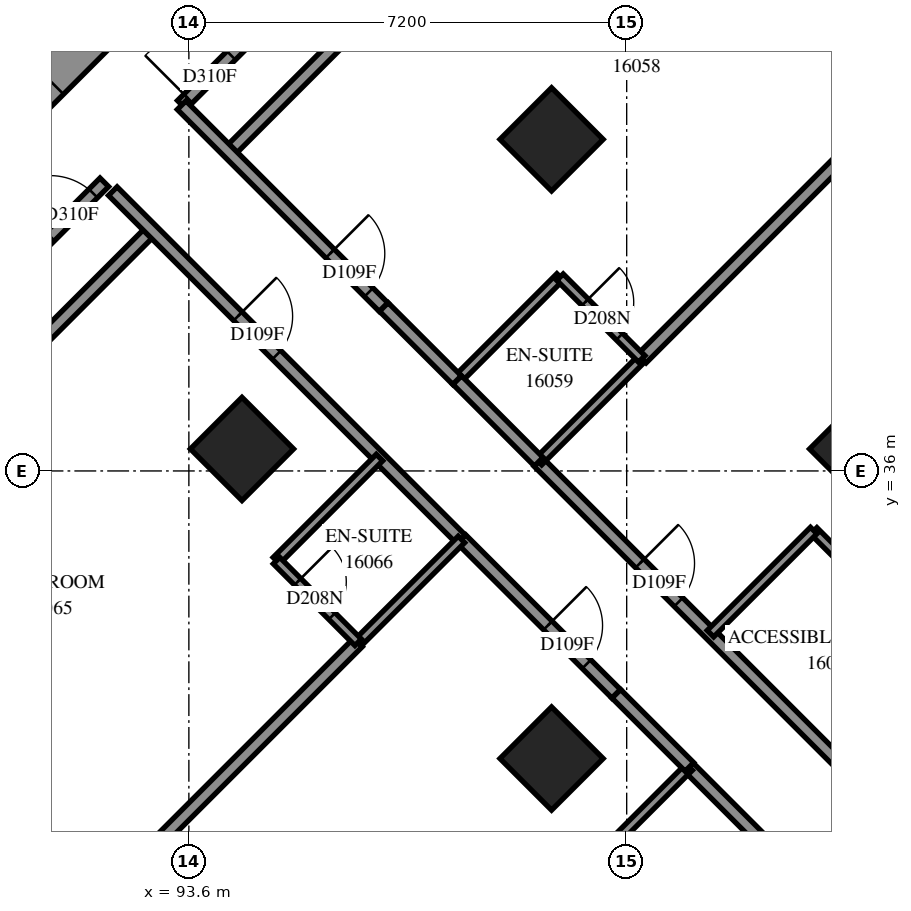
"""IFC4 building model, lengths in metres.
Left out: names, types, materials, properties, quantities, classifications, styles, units other than length and angle.
Written with IfcOpenShell. Run it as: python <this file> out.ifc"""

import sys

from ifc_helpers import new_model, si_unit, direction, frame, frame_2d, origin, origin_2d, place, context, subcontext, project, spatial, polyline, rectangle, outline, extrude, element, fill, save


model = new_model("IFC4")
c1 = context("Model", 3, precision=1e-05, world=origin(), true_north=direction((0.0, 1.0)))
c2 = subcontext(c1, "Body", "Model", "MODEL_VIEW")
j1 = project(units=[si_unit("LENGTHUNIT", "METRE"), si_unit("PLANEANGLEUNIT", "RADIAN")], contexts=[c1])
p1 = place(None, origin())
s1 = spatial("IfcSite", under=j1, at=p1, CompositionType="ELEMENT")
p2 = place(p1, origin())
s2 = spatial("IfcBuilding", under=s1, at=p2, CompositionType="ELEMENT")
p3 = place(p2, frame((0.0, 0.0, 61.0)))
s3 = spatial("IfcBuildingStorey", under=s2, at=p3, CompositionType="ELEMENT", Elevation=61.0)
for number, where, z_axis, x_axis in (
    (1, (99.565, 41.453, 0.0), (0.0, 0.0, 1.0), (0.707, -0.707, 0.0)),
    (2, (94.474, 36.362, 0.0), (0.0, 0.0, 1.0), (0.707, -0.707, 0.0)),
    (3, (104.656, 36.362, 0.0), (0.0, 0.0, 1.0), (0.707, -0.707, 0.0)),
    (4, (99.565, 31.271, 0.0), (0.0, 0.0, 1.0), (0.707, -0.707, 0.0)),
):
    element("IfcColumn", number, at=place(p3, frame(where, z_axis=z_axis, x_axis=x_axis)), inside=s3, PredefinedType="COLUMN", context=c2, shape_type="SweptSolid", body=[
        extrude(rectangle(XDim=1.2, YDim=1.2, at=origin_2d()), origin(), (0.0, 0.0, 1.0), 3.1),
    ])
p4 = place(p3, frame((87.19, 38.554, -0.3), z_axis=(0.0, 0.0, 1.0), x_axis=(0.707103309, 0.7071102534, 0.0)))
e5 = element("IfcWall", 5, at=p4, inside=s3, PredefinedType="SHEAR", context=c2, shape_type="SweptSolid", body=[
    extrude(rectangle(XDim=14.4, YDim=1.0, at=frame_2d((7.2, 0.0))), origin(), (0.0, 0.0, 1.0), 2.7),
])
p5 = place(p4, frame((4.55, 0.0, 0.3)))
e6 = element("IfcOpeningElement", 6, at=p5, cuts=e5, PredefinedType="OPENING", context=c2, shape_type="SweptSolid", body=[
    extrude(rectangle(XDim=1.1, YDim=2.1, at=frame_2d((0.55, 1.05))), frame((0.0, 0.51, 0.0), z_axis=(0.0, -1.0, 0.0), x_axis=(1.0, 0.0, 0.0)), (0.0, 0.0, 1.0), 1.02),
])
p6 = place(p4, frame((11.35, 0.0, 0.3)))
e7 = element("IfcOpeningElement", 7, at=p6, cuts=e5, PredefinedType="OPENING", context=c2, shape_type="SweptSolid", body=[
    extrude(rectangle(XDim=1.1, YDim=2.1, at=frame_2d((0.55, 1.05))), frame((0.0, 0.51, 0.0), z_axis=(0.0, -1.0, 0.0), x_axis=(1.0, 0.0, 0.0)), (0.0, 0.0, 1.0), 1.02),
])
p7 = place(p3, frame((88.018, 30.479, 0.0), z_axis=(0.0, 0.0, 1.0), x_axis=(0.8076021815, -0.589727663, 0.0)))
e8 = element("IfcWall", 8, at=p7, inside=s3, PredefinedType="SOLIDWALL", context=c2, shape_type="SweptSolid", body=[
    extrude(outline(polyline([(-0.043, -0.275), (3.871, -0.275), (3.957, 0.275), (0.043, 0.275), (-0.043, -0.275)])), origin(), (0.0, 0.0, 1.0), 3.1),
])
p8 = place(p7, frame((0.662, 0.0, 0.5)))
e9 = element("IfcOpeningElement", 9, at=p8, cuts=e8, PredefinedType="OPENING", context=c2, shape_type="SweptSolid", body=[
    extrude(rectangle(XDim=2.8, YDim=2.45, at=frame_2d((1.4, 1.225))), frame((0.0, 0.285, 0.0), z_axis=(0.0, -1.0, 0.0), x_axis=(1.0, 0.0, 0.0)), (0.0, 0.0, 1.0), 0.57),
])
p9 = place(p3, frame((101.825, 31.125, 0.0), z_axis=(0.0, 0.0, 1.0), x_axis=(0.7071067812, -0.7071067812, 0.0)))
e10 = element("IfcWall", 10, at=p9, inside=s3, PredefinedType="PARTITIONING", context=c2, shape_type="SweptSolid", body=[
    extrude(rectangle(XDim=12.7, YDim=0.2, at=frame_2d((6.35, 0.0))), origin(), (0.0, 0.0, 1.0), 3.1),
])
p10 = place(p9, frame((3.895, 0.0, 0.0)))
e11 = element("IfcOpeningElement", 11, at=p10, cuts=e10, PredefinedType="OPENING", context=c2, shape_type="SweptSolid", body=[
    extrude(rectangle(XDim=0.9, YDim=2.1, at=frame_2d((0.45, 1.05))), frame((0.0, 0.11, 0.0), z_axis=(0.0, -1.0, 0.0), x_axis=(1.0, 0.0, 0.0)), (0.0, 0.0, 1.0), 0.22),
])
p11 = place(p9, frame((9.056, 0.0, 0.0)))
e12 = element("IfcOpeningElement", 12, at=p11, cuts=e10, PredefinedType="OPENING", context=c2, shape_type="SweptSolid", body=[
    extrude(rectangle(XDim=1.0, YDim=2.1, at=frame_2d((0.5, 1.05))), frame((0.0, 0.11, 0.0), z_axis=(0.0, -1.0, 0.0), x_axis=(1.0, 0.0, 0.0)), (0.0, 0.0, 1.0), 0.22),
])
p12 = place(p3, frame((94.259, 41.243, 0.0), z_axis=(0.0, 0.0, 1.0), x_axis=(0.7070205168, 0.707193035, 0.0)))
e13 = element("IfcWall", 13, at=p12, inside=s3, PredefinedType="PARTITIONING", context=c2, shape_type="SweptSolid", body=[
    extrude(rectangle(XDim=12.173, YDim=0.2, at=frame_2d((6.086, 0.0))), origin(), (0.0, 0.0, 1.0), 3.1),
])
p13 = place(p3, frame((93.484, 42.02, 0.0), z_axis=(0.0, 0.0, 1.0), x_axis=(0.7071067812, 0.7071067812, 0.0)))
e14 = element("IfcWall", 14, at=p13, inside=s3, PredefinedType="PARTITIONING", context=c2, shape_type="SweptSolid", body=[
    extrude(rectangle(XDim=9.998, YDim=0.2, at=frame_2d((4.999, 0.0))), origin(), (0.0, 0.0, 1.0), 3.1),
])
p14 = place(p13, frame((0.148, 0.0, 0.0)))
e15 = element("IfcOpeningElement", 15, at=p14, cuts=e14, PredefinedType="OPENING", context=c2, shape_type="SweptSolid", body=[
    extrude(rectangle(XDim=1.0, YDim=2.1, at=frame_2d((0.5, 1.05))), frame((0.0, 0.11, 0.0), z_axis=(0.0, -1.0, 0.0), x_axis=(1.0, 0.0, 0.0)), (0.0, 0.0, 1.0), 0.22),
])
p15 = place(p3, frame((101.049, 37.847, 0.0), z_axis=(0.0, 0.0, 1.0), x_axis=(0.7071067812, 0.7071067812, 0.0)))
e16 = element("IfcWall", 16, at=p15, inside=s3, PredefinedType="PARTITIONING", context=c2, shape_type="SweptSolid", body=[
    extrude(rectangle(XDim=9.831, YDim=0.2, at=frame_2d((4.915, 0.0))), origin(), (0.0, 0.0, 1.0), 3.1),
])
p16 = place(p3, frame((86.311, 33.282, 0.0), z_axis=(0.0, 0.0, 1.0), x_axis=(0.7069956462, 0.7072178987, 0.0)))
e17 = element("IfcWall", 17, at=p16, inside=s3, PredefinedType="PARTITIONING", context=c2, shape_type="SweptSolid", body=[
    extrude(rectangle(XDim=9.449, YDim=0.2, at=frame_2d((4.724, 0.0))), origin(), (0.0, 0.0, 1.0), 3.1),
])
p17 = place(p3, frame((92.349, 40.601, 0.0), z_axis=(0.0, 0.0, 1.0), x_axis=(0.7071067812, -0.7071067812, 0.0)))
e18 = element("IfcWall", 18, at=p17, inside=s3, PredefinedType="PARTITIONING", context=c2, shape_type="SweptSolid", body=[
    extrude(rectangle(XDim=8.101, YDim=0.2, at=frame_2d((4.05, 0.0))), origin(), (0.0, 0.0, 1.0), 3.1),
])
p18 = place(p17, frame((2.909, 0.0, 0.0)))
e19 = element("IfcOpeningElement", 19, at=p18, cuts=e18, PredefinedType="OPENING", context=c2, shape_type="SweptSolid", body=[
    extrude(rectangle(XDim=0.9, YDim=2.1, at=frame_2d((0.45, 1.05))), frame((0.0, 0.11, 0.0), z_axis=(0.0, -1.0, 0.0), x_axis=(1.0, 0.0, 0.0)), (0.0, 0.0, 1.0), 0.22),
])
p19 = place(p3, frame((86.836, 35.372, 0.0), z_axis=(0.0, 0.0, 1.0), x_axis=(0.7071067812, 0.7071067812, 0.0)))
e20 = element("IfcWall", 20, at=p19, inside=s3, PredefinedType="PARTITIONING", context=c2, shape_type="SweptSolid", body=[
    extrude(rectangle(XDim=7.6, YDim=0.2, at=frame_2d((3.8, 0.0))), origin(), (0.0, 0.0, 1.0), 3.1),
])
p20 = place(p19, frame((6.342, 0.0, 0.0)))
e21 = element("IfcOpeningElement", 21, at=p20, cuts=e20, PredefinedType="OPENING", context=c2, shape_type="SweptSolid", body=[
    extrude(rectangle(XDim=1.0, YDim=2.1, at=frame_2d((0.5, 1.05))), frame((0.0, 0.11, 0.0), z_axis=(0.0, -1.0, 0.0), x_axis=(1.0, 0.0, 0.0)), (0.0, 0.0, 1.0), 0.22),
])
p21 = place(p3, frame((99.349, 36.147, 0.0), z_axis=(0.0, 0.0, 1.0), x_axis=(0.7071067812, -0.7071067812, 0.0)))
e22 = element("IfcWall", 22, at=p21, inside=s3, PredefinedType="PARTITIONING", context=c2, shape_type="SweptSolid", body=[
    extrude(rectangle(XDim=7.201, YDim=0.2, at=frame_2d((3.601, 0.0))), origin(), (0.0, 0.0, 1.0), 3.1),
])
p22 = place(p21, frame((2.358, 0.0, 0.0)))
e23 = element("IfcOpeningElement", 23, at=p22, cuts=e22, PredefinedType="OPENING", context=c2, shape_type="SweptSolid", body=[
    extrude(rectangle(XDim=0.9, YDim=2.1, at=frame_2d((0.45, 1.05))), frame((0.0, 0.11, 0.0), z_axis=(0.0, -1.0, 0.0), x_axis=(1.0, 0.0, 0.0)), (0.0, 0.0, 1.0), 0.22),
])
p23 = place(p3, frame((91.457, 28.256, 0.0), z_axis=(0.0, 0.0, 1.0), x_axis=(0.7071067812, 0.7071067812, 0.0)))
e24 = element("IfcWall", 24, at=p23, inside=s3, PredefinedType="PARTITIONING", context=c2, shape_type="SweptSolid", body=[
    extrude(rectangle(XDim=6.964, YDim=0.2, at=frame_2d((3.482, 0.0))), origin(), (0.0, 0.0, 1.0), 3.1),
])
p24 = place(p3, frame((93.481, 42.015, 0.0), z_axis=(0.0, 0.0, 1.0), x_axis=(0.7071067812, -0.7071067812, 0.0)))
e25 = element("IfcWall", 25, at=p24, inside=s3, PredefinedType="PARTITIONING", context=c2, shape_type="SweptSolid", body=[
    extrude(rectangle(XDim=4.698, YDim=0.2, at=frame_2d((2.349, 0.0))), origin(), (0.0, 0.0, 1.0), 3.1),
])
p25 = place(p24, frame((3.452, 0.0, 0.0)))
e26 = element("IfcOpeningElement", 26, at=p25, cuts=e25, PredefinedType="OPENING", context=c2, shape_type="SweptSolid", body=[
    extrude(rectangle(XDim=0.9, YDim=2.1, at=frame_2d((0.45, 1.05))), frame((0.0, 0.11, 0.0), z_axis=(0.0, -1.0, 0.0), x_axis=(1.0, 0.0, 0.0)), (0.0, 0.0, 1.0), 0.22),
])
p26 = place(p3, frame((98.082, 34.879, 0.0), z_axis=(0.0, 0.0, 1.0), x_axis=(0.7073845681, -0.7068288851, 0.0)))
e27 = element("IfcWall", 27, at=p26, inside=s3, PredefinedType="PARTITIONING", context=c2, shape_type="SweptSolid", body=[
    extrude(rectangle(XDim=3.599, YDim=0.2, at=frame_2d((1.8, 0.0))), origin(), (0.0, 0.0, 1.0), 3.1),
])
p27 = place(p26, frame((2.009, 0.0, 0.0)))
e28 = element("IfcOpeningElement", 28, at=p27, cuts=e27, PredefinedType="OPENING", context=c2, shape_type="SweptSolid", body=[
    extrude(rectangle(XDim=0.9, YDim=2.1, at=frame_2d((0.45, 1.05))), frame((0.0, 0.11, 0.0), z_axis=(0.0, -1.0, 0.0), x_axis=(1.0, 0.0, 0.0)), (0.0, 0.0, 1.0), 0.22),
])
p28 = place(p3, frame((103.875, 35.015, 0.0), z_axis=(0.0, 0.0, 1.0), x_axis=(0.7071067812, -0.7071067812, 0.0)))
e29 = element("IfcWall", 29, at=p28, inside=s3, PredefinedType="PARTITIONING", context=c2, shape_type="SweptSolid", body=[
    extrude(rectangle(XDim=3.199, YDim=0.15, at=frame_2d((1.599, 0.0))), origin(), (0.0, 0.0, 1.0), 3.1),
])
p29 = place(p28, frame((1.27, 0.0, 0.0)))
e30 = element("IfcOpeningElement", 30, at=p29, cuts=e29, PredefinedType="OPENING", context=c2, shape_type="SweptSolid", body=[
    extrude(rectangle(XDim=0.8, YDim=2.1, at=frame_2d((0.4, 1.05))), frame((0.0, 0.085, 0.0), z_axis=(0.0, -1.0, 0.0), x_axis=(1.0, 0.0, 0.0)), (0.0, 0.0, 1.0), 0.17),
])
p30 = place(p3, frame((100.129, 29.433, 0.0), z_axis=(0.0, 0.0, 1.0), x_axis=(0.7071067812, 0.7071067812, 0.0)))
e31 = element("IfcWall", 31, at=p30, inside=s3, PredefinedType="PARTITIONING", context=c2, shape_type="SweptSolid", body=[
    extrude(rectangle(XDim=2.401, YDim=0.15, at=frame_2d((1.201, 0.0))), origin(), (0.0, 0.0, 1.0), 3.1),
])
for number, where, z_axis, x_axis in (
    (32, (96.384, 33.178, 0.0), (0.0, 0.0, 1.0), (0.708, 0.707, 0.0)),
    (33, (99.349, 36.153, 0.0), (0.0, 0.0, 1.0), (0.708, 0.707, 0.0)),
    (34, (102.177, 33.325, 0.0), (0.0, 0.0, 1.0), (0.708, 0.707, 0.0)),
):
    element("IfcWall", number, at=place(p3, frame(where, z_axis=z_axis, x_axis=x_axis)), inside=s3, PredefinedType="PARTITIONING", context=c2, shape_type="SweptSolid", body=[
        extrude(rectangle(XDim=2.4, YDim=0.15, at=frame_2d((1.2, 0.0))), origin(), (0.0, 0.0, 1.0), 3.1),
    ])
for number, where, z_axis, x_axis in (
    (35, (95.039, 34.525, 0.0), (0.0, 0.0, 1.0), (0.707, 0.707, 0.0)),
    (36, (98.009, 37.495, 0.0), (0.0, 0.0, 1.0), (0.707, 0.707, 0.0)),
):
    element("IfcWall", number, at=place(p3, frame(where, z_axis=z_axis, x_axis=x_axis)), inside=s3, PredefinedType="PARTITIONING", context=c2, shape_type="SweptSolid", body=[
        extrude(rectangle(XDim=2.398, YDim=0.15, at=frame_2d((1.199, 0.0))), origin(), (0.0, 0.0, 1.0), 3.1),
    ])
p31 = place(p3, frame((99.703, 39.187, 0.0), z_axis=(0.0, 0.0, 1.0), x_axis=(0.7071067812, -0.7071067812, 0.0)))
e37 = element("IfcWall", 37, at=p31, inside=s3, PredefinedType="PARTITIONING", context=c2, shape_type="SweptSolid", body=[
    extrude(rectangle(XDim=1.901, YDim=0.15, at=frame_2d((0.95, 0.0))), origin(), (0.0, 0.0, 1.0), 3.1),
])
p32 = place(p31, frame((0.584, 0.0, 0.0)))
e38 = element("IfcOpeningElement", 38, at=p32, cuts=e37, PredefinedType="OPENING", context=c2, shape_type="SweptSolid", body=[
    extrude(rectangle(XDim=0.8, YDim=2.1, at=frame_2d((0.4, 1.05))), frame((0.0, 0.085, 0.0), z_axis=(0.0, -1.0, 0.0), x_axis=(1.0, 0.0, 0.0)), (0.0, 0.0, 1.0), 0.17),
])
p33 = place(p3, frame((98.012, 37.496, 0.0), z_axis=(0.0, 0.0, 1.0), x_axis=(0.7065800724, -0.7076330979, 0.0)))
e39 = element("IfcWall", 39, at=p33, inside=s3, PredefinedType="PARTITIONING", context=c2, shape_type="SweptSolid", body=[
    extrude(rectangle(XDim=1.899, YDim=0.2, at=frame_2d((0.95, 0.0))), origin(), (0.0, 0.0, 1.0), 3.1),
])
p34 = place(p3, frame((95.042, 34.526, 0.0), z_axis=(0.0, 0.0, 1.0), x_axis=(0.7065800724, -0.7076330979, 0.0)))
e40 = element("IfcWall", 40, at=p34, inside=s3, PredefinedType="PARTITIONING", context=c2, shape_type="SweptSolid", body=[
    extrude(rectangle(XDim=1.899, YDim=0.15, at=frame_2d((0.95, 0.0))), origin(), (0.0, 0.0, 1.0), 3.1),
])
p35 = place(p34, frame((0.491, 0.0, 0.0)))
e41 = element("IfcOpeningElement", 41, at=p35, cuts=e40, PredefinedType="OPENING", context=c2, shape_type="SweptSolid", body=[
    extrude(rectangle(XDim=0.8, YDim=2.1, at=frame_2d((0.4, 1.05))), frame((0.0, 0.085, 0.0), z_axis=(0.0, -1.0, 0.0), x_axis=(1.0, 0.0, 0.0)), (0.0, 0.0, 1.0), 0.17),
])
p36 = place(p3, frame((96.806, 38.696, 0.0), z_axis=(0.0, 0.0, 1.0), x_axis=(0.7076943229, -0.7065187509, 0.0)))
e42 = element("IfcWall", 42, at=p36, inside=s3, PredefinedType="PARTITIONING", context=c2, shape_type="SweptSolid", body=[
    extrude(rectangle(XDim=1.701, YDim=0.2, at=frame_2d((0.851, 0.0))), origin(), (0.0, 0.0, 1.0), 3.1),
])
p37 = place(p3, frame((100.629, 32.335, 0.0), z_axis=(0.0, 0.0, 1.0), x_axis=(0.7071067812, -0.7071067812, 0.0)))
e43 = element("IfcWall", 43, at=p37, inside=s3, PredefinedType="PARTITIONING", context=c2, shape_type="SweptSolid", body=[
    extrude(rectangle(XDim=1.7, YDim=0.2, at=frame_2d((0.85, 0.0))), origin(), (0.0, 0.0, 1.0), 3.1),
])
p38 = place(p14, origin())
e44 = element("IfcDoor", 44, at=p38, inside=s3, OperationType="SINGLE_SWING_LEFT", PredefinedType="DOOR", context=c2, shape_type="SweptSolid", body=[
    extrude(rectangle(XDim=1.0, YDim=2.1, at=frame_2d((0.5, 1.05))), frame((0.0, 0.025, 0.0), z_axis=(0.0, -1.0, 0.0), x_axis=(1.0, 0.0, 0.0)), (0.0, 0.0, 1.0), 0.05),
])
fill(e15, e44)
p39 = place(p25, origin())
e45 = element("IfcDoor", 45, at=p39, inside=s3, OperationType="SINGLE_SWING_RIGHT", PredefinedType="DOOR", context=c2, shape_type="SweptSolid", body=[
    extrude(rectangle(XDim=0.9, YDim=2.1, at=frame_2d((0.45, 1.05))), frame((0.0, 0.025, 0.0), z_axis=(0.0, -1.0, 0.0), x_axis=(1.0, 0.0, 0.0)), (0.0, 0.0, 1.0), 0.05),
])
fill(e26, e45)
p40 = place(p32, origin())
e46 = element("IfcDoor", 46, at=p40, inside=s3, OperationType="SINGLE_SWING_RIGHT", PredefinedType="DOOR", context=c2, shape_type="SweptSolid", body=[
    extrude(rectangle(XDim=0.8, YDim=2.1, at=frame_2d((0.4, 1.05))), frame((0.0, 0.025, 0.0), z_axis=(0.0, -1.0, 0.0), x_axis=(1.0, 0.0, 0.0)), (0.0, 0.0, 1.0), 0.05),
])
fill(e38, e46)
p41 = place(p22, origin())
e47 = element("IfcDoor", 47, at=p41, inside=s3, OperationType="SINGLE_SWING_RIGHT", PredefinedType="DOOR", context=c2, shape_type="SweptSolid", body=[
    extrude(rectangle(XDim=0.9, YDim=2.1, at=frame_2d((0.45, 1.05))), frame((0.0, 0.025, 0.0), z_axis=(0.0, -1.0, 0.0), x_axis=(1.0, 0.0, 0.0)), (0.0, 0.0, 1.0), 0.05),
])
fill(e23, e47)
p42 = place(p20, origin())
e48 = element("IfcDoor", 48, at=p42, inside=s3, OperationType="SINGLE_SWING_RIGHT", PredefinedType="DOOR", context=c2, shape_type="SweptSolid", body=[
    extrude(rectangle(XDim=1.0, YDim=2.1, at=frame_2d((0.5, 1.05))), frame((0.0, 0.025, 0.0), z_axis=(0.0, -1.0, 0.0), x_axis=(1.0, 0.0, 0.0)), (0.0, 0.0, 1.0), 0.05),
])
fill(e21, e48)
p43 = place(p18, origin())
e49 = element("IfcDoor", 49, at=p43, inside=s3, OperationType="SINGLE_SWING_LEFT", PredefinedType="DOOR", context=c2, shape_type="SweptSolid", body=[
    extrude(rectangle(XDim=0.9, YDim=2.1, at=frame_2d((0.45, 1.05))), frame((0.0, 0.025, 0.0), z_axis=(0.0, -1.0, 0.0), x_axis=(1.0, 0.0, 0.0)), (0.0, 0.0, 1.0), 0.05),
])
fill(e19, e49)
p44 = place(p35, origin())
e50 = element("IfcDoor", 50, at=p44, inside=s3, OperationType="SINGLE_SWING_RIGHT", PredefinedType="DOOR", context=c2, shape_type="SweptSolid", body=[
    extrude(rectangle(XDim=0.8, YDim=2.1, at=frame_2d((0.4, 1.05))), frame((0.0, 0.025, 0.0), z_axis=(0.0, -1.0, 0.0), x_axis=(1.0, 0.0, 0.0)), (0.0, 0.0, 1.0), 0.05),
])
fill(e41, e50)
p45 = place(p27, origin())
e51 = element("IfcDoor", 51, at=p45, inside=s3, OperationType="SINGLE_SWING_LEFT", PredefinedType="DOOR", context=c2, shape_type="SweptSolid", body=[
    extrude(rectangle(XDim=0.9, YDim=2.1, at=frame_2d((0.45, 1.05))), frame((0.0, 0.025, 0.0), z_axis=(0.0, -1.0, 0.0), x_axis=(1.0, 0.0, 0.0)), (0.0, 0.0, 1.0), 0.05),
])
fill(e28, e51)
save(model, sys.argv[1])
